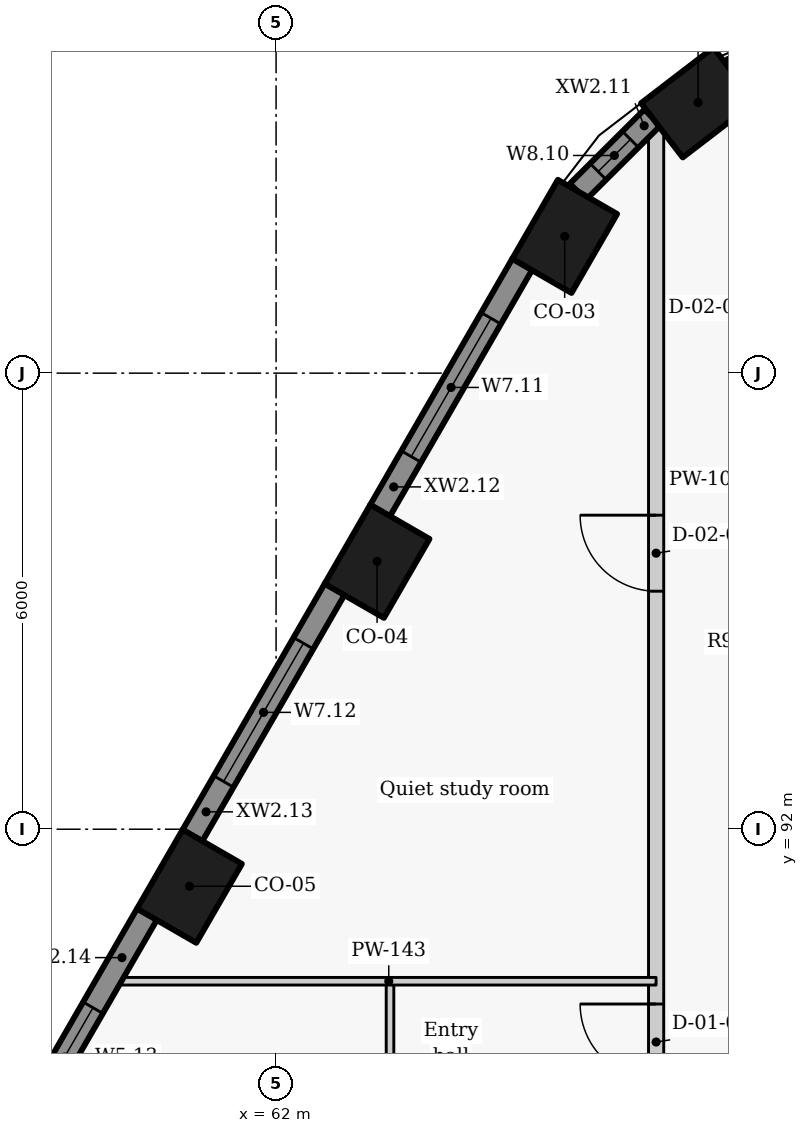
"""IFC4 building model, lengths in metres.
Left out: names, types, materials, properties, quantities, classifications, styles, units other than length and angle.
Written with IfcOpenShell. Run it as: python <this file> out.ifc"""

import sys

from ifc_helpers import new_model, si_unit, direction, frame, frame_2d, origin, origin_2d, place, context, subcontext, project, spatial, rectangle, extrude, element, fill, save


model = new_model("IFC4")
c1 = context("Model", 3, precision=1e-05, world=origin(), true_north=direction((0.0, 1.0)))
c2 = subcontext(c1, "Body", "Model", "MODEL_VIEW")
j1 = project(units=[si_unit("LENGTHUNIT", "METRE"), si_unit("PLANEANGLEUNIT", "RADIAN")], contexts=[c1])
p1 = place(None, origin())
s1 = spatial("IfcSite", under=j1, at=p1, CompositionType="ELEMENT")
p2 = place(p1, origin())
s2 = spatial("IfcBuilding", under=s1, at=p2, CompositionType="ELEMENT")
p3 = place(p2, frame((0.0, 0.0, 180.0)))
s3 = spatial("IfcBuildingStorey", under=s2, at=p3, CompositionType="ELEMENT", Elevation=180.0)
for number, where, z_axis, x_axis in (
    (1, (67.552, 101.56, 0.0), (0.0, 0.0, 1.0), (-0.793, -0.609, 0.0)),
    (2, (65.797, 99.8, 0.0), (0.0, 0.0, 1.0), (-0.5, -0.866, 0.0)),
    (3, (63.329, 95.525, 0.0), (0.0, 0.0, 1.0), (-0.5, -0.866, 0.0)),
    (4, (60.861, 91.25, 0.0), (0.0, 0.0, 1.0), (-0.5, -0.866, 0.0)),
):
    element("IfcColumn", number, at=place(p3, frame(where, z_axis=z_axis, x_axis=x_axis)), inside=s3, PredefinedType="COLUMN", context=c2, shape_type="SweptSolid", body=[
        extrude(rectangle(XDim=1.2, YDim=0.9, at=origin_2d()), origin(), (0.0, 0.0, 1.0), 3.3),
    ])
p4 = place(p3, frame((69.336, 102.333, 0.0), z_axis=(0.0, 0.0, 1.0), x_axis=(-0.969037396898, -0.246914000036, 0.0)))
e5 = element("IfcWall", 5, at=p4, inside=s3, PredefinedType="SOLIDWALL", context=c2, shape_type="SweptSolid", body=[
    extrude(rectangle(XDim=1.403, YDim=0.3, at=frame_2d((0.702, 0.0))), origin(), (0.0, 0.0, 1.0), 2.425),
])
p5 = place(p4, frame((0.229, 0.0, 0.9)))
e6 = element("IfcOpeningElement", 6, at=p5, cuts=e5, PredefinedType="OPENING", context=c2, shape_type="SweptSolid", body=[
    extrude(rectangle(XDim=0.6, YDim=1.1, at=frame_2d((0.3, 0.55))), frame((0.0, 0.16, 0.0), z_axis=(0.0, -1.0, 0.0), x_axis=(1.0, 0.0, 0.0)), (0.0, 0.0, 1.0), 0.32),
])
p6 = place(p3, frame((66.952, 101.363, 0.0), z_axis=(0.0, 0.0, 1.0), x_axis=(-0.70869320446, -0.705516790695, 0.0)))
e7 = element("IfcWall", 7, at=p6, inside=s3, PredefinedType="SOLIDWALL", context=c2, shape_type="SweptSolid", body=[
    extrude(rectangle(XDim=1.384, YDim=0.3, at=frame_2d((0.692, 0.0))), origin(), (0.0, 0.0, 1.0), 2.425),
])
p7 = place(p6, frame((0.408, 0.0, 0.9)))
e8 = element("IfcOpeningElement", 8, at=p7, cuts=e7, PredefinedType="OPENING", context=c2, shape_type="SweptSolid", body=[
    extrude(rectangle(XDim=0.6, YDim=1.1, at=frame_2d((0.3, 0.55))), frame((0.0, 0.16, 0.0), z_axis=(0.0, -1.0, 0.0), x_axis=(1.0, 0.0, 0.0)), (0.0, 0.0, 1.0), 0.32),
])
p8 = place(p3, frame((65.239, 99.433, 0.0), z_axis=(0.0, 0.0, 1.0), x_axis=(-0.499982088007, -0.866035745032, 0.0)))
e9 = element("IfcWall", 9, at=p8, inside=s3, PredefinedType="SOLIDWALL", context=c2, shape_type="SweptSolid", body=[
    extrude(rectangle(XDim=3.744, YDim=0.3, at=frame_2d((1.872, 0.0))), origin(), (0.0, 0.0, 1.0), 2.425),
])
p9 = place(p8, frame((0.822, 0.0, 0.9)))
e10 = element("IfcOpeningElement", 10, at=p9, cuts=e9, PredefinedType="OPENING", context=c2, shape_type="SweptSolid", body=[
    extrude(rectangle(XDim=2.1, YDim=1.1, at=frame_2d((1.05, 0.55))), frame((0.0, 0.16, 0.0), z_axis=(0.0, -1.0, 0.0), x_axis=(1.0, 0.0, 0.0)), (0.0, 0.0, 1.0), 0.32),
])
p10 = place(p3, frame((62.771, 95.158, 0.0), z_axis=(0.0, 0.0, 1.0), x_axis=(-0.500059225181, -0.86599120741, 0.0)))
e11 = element("IfcWall", 11, at=p10, inside=s3, PredefinedType="SOLIDWALL", context=c2, shape_type="SweptSolid", body=[
    extrude(rectangle(XDim=3.744, YDim=0.3, at=frame_2d((1.872, 0.0))), origin(), (0.0, 0.0, 1.0), 2.425),
])
p11 = place(p10, frame((0.822, 0.0, 0.9)))
e12 = element("IfcOpeningElement", 12, at=p11, cuts=e11, PredefinedType="OPENING", context=c2, shape_type="SweptSolid", body=[
    extrude(rectangle(XDim=2.1, YDim=1.1, at=frame_2d((1.05, 0.55))), frame((0.0, 0.16, 0.0), z_axis=(0.0, -1.0, 0.0), x_axis=(1.0, 0.0, 0.0)), (0.0, 0.0, 1.0), 0.32),
])
p12 = place(p3, frame((60.303, 90.884, 0.0), z_axis=(0.0, 0.0, 1.0), x_axis=(-0.499955427682, -0.866051136095, 0.0)))
e13 = element("IfcWall", 13, at=p12, inside=s3, PredefinedType="SOLIDWALL", context=c2, shape_type="SweptSolid", body=[
    extrude(rectangle(XDim=3.447, YDim=0.3, at=frame_2d((1.724, 0.0))), origin(), (0.0, 0.0, 1.0), 2.425),
])
p13 = place(p12, frame((1.423, 0.0, 0.9)))
e14 = element("IfcOpeningElement", 14, at=p13, cuts=e13, PredefinedType="OPENING", context=c2, shape_type="SweptSolid", body=[
    extrude(rectangle(XDim=1.5, YDim=1.1, at=frame_2d((0.75, 0.55))), frame((0.0, 0.16, 0.0), z_axis=(0.0, -1.0, 0.0), x_axis=(1.0, 0.0, 0.0)), (0.0, 0.0, 1.0), 0.32),
])
p14 = place(p3, frame((67.0, 58.674, 0.0), z_axis=(0.0, 0.0, 1.0), x_axis=(0.0, 1.0, 0.0)))
e15 = element("IfcWall", 15, at=p14, inside=s3, PredefinedType="PARTITIONING", context=c2, shape_type="SweptSolid", body=[
    extrude(rectangle(XDim=42.592, YDim=0.2, at=frame_2d((21.296, 0.0))), origin(), (0.0, 0.0, 1.0), 2.405),
])
p15 = place(p14, frame((2.376, 0.0, 0.0)))
e16 = element("IfcOpeningElement", 16, at=p15, cuts=e15, PredefinedType="OPENING", context=c2, shape_type="SweptSolid", body=[
    extrude(rectangle(XDim=1.0, YDim=2.1, at=frame_2d((0.5, 1.05))), frame((0.0, 0.11, 0.0), z_axis=(0.0, -1.0, 0.0), x_axis=(1.0, 0.0, 0.0)), (0.0, 0.0, 1.0), 0.22),
])
p16 = place(p14, frame((13.601, 0.0, 0.0)))
e17 = element("IfcOpeningElement", 17, at=p16, cuts=e15, PredefinedType="OPENING", context=c2, shape_type="SweptSolid", body=[
    extrude(rectangle(XDim=1.0, YDim=2.1, at=frame_2d((0.5, 1.05))), frame((0.0, 0.11, 0.0), z_axis=(0.0, -1.0, 0.0), x_axis=(1.0, 0.0, 0.0)), (0.0, 0.0, 1.0), 0.22),
])
p17 = place(p14, frame((30.026, 0.0, 0.0)))
e18 = element("IfcOpeningElement", 18, at=p17, cuts=e15, PredefinedType="OPENING", context=c2, shape_type="SweptSolid", body=[
    extrude(rectangle(XDim=1.0, YDim=2.1, at=frame_2d((0.5, 1.05))), frame((0.0, 0.11, 0.0), z_axis=(0.0, -1.0, 0.0), x_axis=(1.0, 0.0, 0.0)), (0.0, 0.0, 1.0), 0.22),
])
p18 = place(p14, frame((36.457, 0.0, 0.0)))
e19 = element("IfcOpeningElement", 19, at=p18, cuts=e15, PredefinedType="OPENING", context=c2, shape_type="SweptSolid", body=[
    extrude(rectangle(XDim=1.0, YDim=2.1, at=frame_2d((0.5, 1.05))), frame((0.0, 0.11, 0.0), z_axis=(0.0, -1.0, 0.0), x_axis=(1.0, 0.0, 0.0)), (0.0, 0.0, 1.0), 0.22),
])
p19 = place(p3, frame((63.499, 82.55, 0.0), z_axis=(0.0, 0.0, 1.0), x_axis=(0.0, 1.0, 0.0)))
e20 = element("IfcWall", 20, at=p19, inside=s3, PredefinedType="PARTITIONING", context=c2, shape_type="SweptSolid", body=[
    extrude(rectangle(XDim=7.45, YDim=0.1, at=frame_2d((3.725, 0.0))), origin(), (0.0, 0.0, 1.0), 2.405),
])
p20 = place(p19, frame((3.275, 0.0, 0.0)))
e21 = element("IfcOpeningElement", 21, at=p20, cuts=e20, PredefinedType="OPENING", context=c2, shape_type="SweptSolid", body=[
    extrude(rectangle(XDim=0.9, YDim=2.1, at=frame_2d((0.45, 1.05))), frame((0.0, 0.06, 0.0), z_axis=(0.0, -1.0, 0.0), x_axis=(1.0, 0.0, 0.0)), (0.0, 0.0, 1.0), 0.12),
])
p21 = place(p3, frame((59.966, 90.0, 0.0), z_axis=(0.0, 0.0, 1.0), x_axis=(1.0, 0.0, 0.0)))
e22 = element("IfcWall", 22, at=p21, inside=s3, PredefinedType="PARTITIONING", context=c2, shape_type="SweptSolid", body=[
    extrude(rectangle(XDim=7.033, YDim=0.1, at=frame_2d((3.517, 0.0))), origin(), (0.0, 0.0, 1.0), 2.405),
])
p22 = place(p7, origin())
e23 = element("IfcWindow", 23, at=p22, inside=s3, PartitioningType="SINGLE_PANEL", PredefinedType="WINDOW", context=c2, shape_type="SweptSolid", body=[
    extrude(rectangle(XDim=0.6, YDim=1.1, at=frame_2d((0.3, 0.55))), frame((0.0, 0.03, 0.0), z_axis=(0.0, -1.0, 0.0), x_axis=(1.0, 0.0, 0.0)), (0.0, 0.0, 1.0), 0.06),
])
fill(e8, e23)
p23 = place(p9, origin())
e24 = element("IfcWindow", 24, at=p23, inside=s3, PartitioningType="SINGLE_PANEL", PredefinedType="WINDOW", context=c2, shape_type="SweptSolid", body=[
    extrude(rectangle(XDim=2.1, YDim=1.1, at=frame_2d((1.05, 0.55))), frame((0.0, 0.03, 0.0), z_axis=(0.0, -1.0, 0.0), x_axis=(1.0, 0.0, 0.0)), (0.0, 0.0, 1.0), 0.06),
])
fill(e10, e24)
p24 = place(p11, origin())
e25 = element("IfcWindow", 25, at=p24, inside=s3, PartitioningType="SINGLE_PANEL", PredefinedType="WINDOW", context=c2, shape_type="SweptSolid", body=[
    extrude(rectangle(XDim=2.1, YDim=1.1, at=frame_2d((1.05, 0.55))), frame((0.0, 0.03, 0.0), z_axis=(0.0, -1.0, 0.0), x_axis=(1.0, 0.0, 0.0)), (0.0, 0.0, 1.0), 0.06),
])
fill(e12, e25)
p25 = place(p13, origin())
e26 = element("IfcWindow", 26, at=p25, inside=s3, PartitioningType="SINGLE_PANEL", PredefinedType="WINDOW", context=c2, shape_type="SweptSolid", body=[
    extrude(rectangle(XDim=1.5, YDim=1.1, at=frame_2d((0.75, 0.55))), frame((0.0, 0.03, 0.0), z_axis=(0.0, -1.0, 0.0), x_axis=(1.0, 0.0, 0.0)), (0.0, 0.0, 1.0), 0.06),
])
fill(e14, e26)
p26 = place(p17, origin())
e27 = element("IfcDoor", 27, at=p26, inside=s3, OperationType="SINGLE_SWING_RIGHT", PredefinedType="DOOR", context=c2, shape_type="SweptSolid", body=[
    extrude(rectangle(XDim=1.0, YDim=2.1, at=frame_2d((0.5, 1.05))), frame((0.0, 0.025, 0.0), z_axis=(0.0, -1.0, 0.0), x_axis=(1.0, 0.0, 0.0)), (0.0, 0.0, 1.0), 0.05),
])
fill(e18, e27)
p27 = place(p18, origin())
e28 = element("IfcDoor", 28, at=p27, inside=s3, OperationType="SINGLE_SWING_RIGHT", PredefinedType="DOOR", context=c2, shape_type="SweptSolid", body=[
    extrude(rectangle(XDim=1.0, YDim=2.1, at=frame_2d((0.5, 1.05))), frame((0.0, 0.025, 0.0), z_axis=(0.0, -1.0, 0.0), x_axis=(1.0, 0.0, 0.0)), (0.0, 0.0, 1.0), 0.05),
])
fill(e19, e28)
save(model, sys.argv[1])
